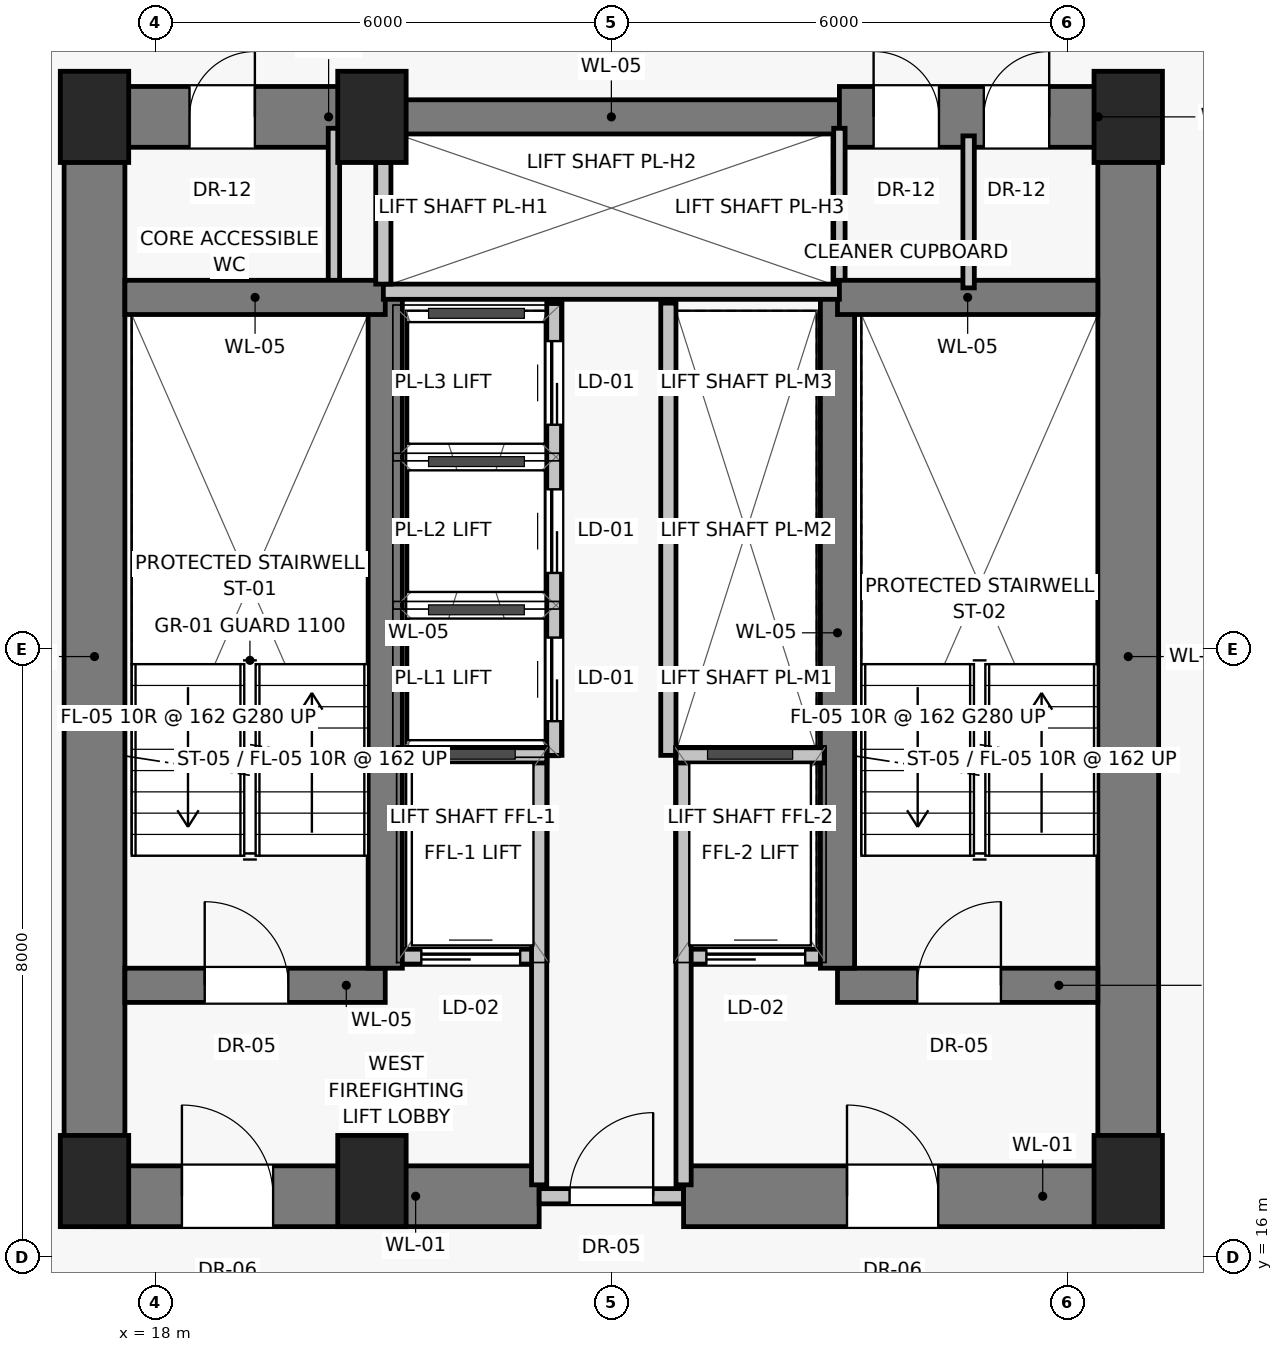
"""IFC4 building model, lengths in metres.
Left out: names, types, materials, properties, quantities, classifications, styles, units other than length and angle.
Written with IfcOpenShell. Run it as: python <this file> out.ifc"""

import sys

from ifc_helpers import new_model, si_unit, direction, frame, frame_2d, origin, origin_2d, place, context, subcontext, project, spatial, rectangle, extrude, source, transform, mapped, element, fill, save


model = new_model("IFC4")
c1 = context("Model", 3, precision=1e-05, world=origin(), true_north=direction((0.0, 1.0)))
c2 = subcontext(c1, "Body", "Model", "MODEL_VIEW")
j1 = project(units=[si_unit("LENGTHUNIT", "METRE"), si_unit("PLANEANGLEUNIT", "RADIAN")], contexts=[c1])
p1 = place(None, origin())
s1 = spatial("IfcSite", under=j1, at=p1, CompositionType="ELEMENT")
p2 = place(p1, origin())
s2 = spatial("IfcBuilding", under=s1, at=p2, CompositionType="ELEMENT")
p3 = place(p2, frame((0.0, 0.0, 77.1)))
s3 = spatial("IfcBuildingStorey", under=s2, at=p3, CompositionType="ELEMENT", Elevation=77.1)
for number, where, z_axis, x_axis in (
    (1, (17.2, 17.0, 0.0), (0.0, 0.0, 1.0), (1.0, 0.0, 0.0)),
    (2, (20.85, 17.0, 0.0), (0.0, 0.0, 1.0), (1.0, 0.0, 0.0)),
    (3, (30.8, 17.0, 0.0), (0.0, 0.0, 1.0), (1.0, 0.0, 0.0)),
    (4, (17.2, 31.0, 0.0), (0.0, 0.0, 1.0), (1.0, 0.0, 0.0)),
    (5, (20.85, 31.0, 0.0), (0.0, 0.0, 1.0), (1.0, 0.0, 0.0)),
    (6, (30.8, 31.0, 0.0), (0.0, 0.0, 1.0), (1.0, 0.0, 0.0)),
):
    element("IfcColumn", number, at=place(p3, frame(where, z_axis=z_axis, x_axis=x_axis)), inside=s3, PredefinedType="PILASTER", context=c2, shape_type="SweptSolid", body=[
        extrude(rectangle(XDim=0.9, YDim=1.2, at=origin_2d()), origin(), (0.0, 0.0, 1.0), 3.25),
    ])
for number, where, z_axis, x_axis in (
    (7, (17.2, 16.8, 0.0), (0.0, 0.0, 1.0), (0.0, 1.0, 0.0)),
    (8, (30.8, 16.8, 0.0), (0.0, 0.0, 1.0), (0.0, 1.0, 0.0)),
):
    element("IfcWall", number, at=place(p3, frame(where, z_axis=z_axis, x_axis=x_axis)), inside=s3, PredefinedType="SHEAR", context=c2, shape_type="SweptSolid", body=[
        extrude(rectangle(XDim=14.2, YDim=0.8, at=frame_2d((7.1, 0.0))), origin(), (0.0, 0.0, 1.0), 2.93),
    ])
p4 = place(p3, frame((17.2, 16.8, 0.0), z_axis=(0.0, 0.0, 1.0), x_axis=(1.0, 0.0, 0.0)))
e9 = element("IfcWall", 9, at=p4, inside=s3, PredefinedType="SHEAR", context=c2, shape_type="SweptSolid", body=[
    extrude(rectangle(XDim=5.85, YDim=0.8, at=frame_2d((2.925, 0.0))), origin(), (0.0, 0.0, 1.0), 2.93),
])
p5 = place(p4, frame((1.15, 0.0, 0.0)))
e10 = element("IfcOpeningElement", 10, at=p5, cuts=e9, PredefinedType="OPENING", context=c2, shape_type="SweptSolid", body=[
    extrude(rectangle(XDim=1.2, YDim=2.03, at=frame_2d((0.6, 1.015))), frame((0.0, 0.41, 0.0), z_axis=(0.0, -1.0, 0.0), x_axis=(1.0, 0.0, 0.0)), (0.0, 0.0, 1.0), 0.82),
])
p6 = place(p3, frame((23.05, 16.8, 0.0), z_axis=(0.0, 0.0, 1.0), x_axis=(1.0, 0.0, 0.0)))
e11 = element("IfcWall", 11, at=p6, inside=s3, PredefinedType="SOLIDWALL", context=c2, shape_type="SweptSolid", body=[
    extrude(rectangle(XDim=1.9, YDim=0.2, at=frame_2d((0.95, 0.0))), origin(), (0.0, 0.0, 1.0), 2.08),
])
p7 = place(p6, frame((0.4, 0.0, 0.0)))
e12 = element("IfcOpeningElement", 12, at=p7, cuts=e11, PredefinedType="OPENING", context=c2, shape_type="SweptSolid", body=[
    extrude(rectangle(XDim=1.1, YDim=2.03, at=frame_2d((0.55, 1.015))), frame((0.0, 0.11, 0.0), z_axis=(0.0, -1.0, 0.0), x_axis=(1.0, 0.0, 0.0)), (0.0, 0.0, 1.0), 0.22),
])
p8 = place(p3, frame((24.95, 16.8, 0.0), z_axis=(0.0, 0.0, 1.0), x_axis=(1.0, 0.0, 0.0)))
e13 = element("IfcWall", 13, at=p8, inside=s3, PredefinedType="SHEAR", context=c2, shape_type="SweptSolid", body=[
    extrude(rectangle(XDim=5.85, YDim=0.8, at=frame_2d((2.925, 0.0))), origin(), (0.0, 0.0, 1.0), 2.93),
])
p9 = place(p8, frame((2.15, 0.0, 0.0)))
e14 = element("IfcOpeningElement", 14, at=p9, cuts=e13, PredefinedType="OPENING", context=c2, shape_type="SweptSolid", body=[
    extrude(rectangle(XDim=1.2, YDim=2.03, at=frame_2d((0.6, 1.015))), frame((0.0, 0.41, 0.0), z_axis=(0.0, -1.0, 0.0), x_axis=(1.0, 0.0, 0.0)), (0.0, 0.0, 1.0), 0.82),
])
p10 = place(p3, frame((17.2, 31.0, 0.0), z_axis=(0.0, 0.0, 1.0), x_axis=(1.0, 0.0, 0.0)))
e15 = element("IfcWall", 15, at=p10, inside=s3, PredefinedType="SHEAR", context=c2, shape_type="SweptSolid", body=[
    extrude(rectangle(XDim=3.8, YDim=0.8, at=frame_2d((1.9, 0.0))), origin(), (0.0, 0.0, 1.0), 2.93),
])
p11 = place(p10, frame((1.25, 0.0, 0.0)))
e16 = element("IfcOpeningElement", 16, at=p11, cuts=e15, PredefinedType="OPENING", context=c2, shape_type="SweptSolid", body=[
    extrude(rectangle(XDim=0.86, YDim=2.01, at=frame_2d((0.43, 1.005))), frame((0.0, 0.41, 0.0), z_axis=(0.0, -1.0, 0.0), x_axis=(1.0, 0.0, 0.0)), (0.0, 0.0, 1.0), 0.82),
])
p12 = place(p3, frame((21.0, 31.0, 0.0), z_axis=(0.0, 0.0, 1.0), x_axis=(1.0, 0.0, 0.0)))
e17 = element("IfcWall", 17, at=p12, inside=s3, PredefinedType="SHEAR", context=c2, shape_type="SweptSolid", body=[
    extrude(rectangle(XDim=6.0, YDim=0.45, at=frame_2d((3.0, 0.0))), origin(), (0.0, 0.0, 1.0), 2.93),
])
p13 = place(p3, frame((27.0, 31.0, 0.0), z_axis=(0.0, 0.0, 1.0), x_axis=(1.0, 0.0, 0.0)))
e18 = element("IfcWall", 18, at=p13, inside=s3, PredefinedType="SHEAR", context=c2, shape_type="SweptSolid", body=[
    extrude(rectangle(XDim=3.8, YDim=0.8, at=frame_2d((1.9, 0.0))), origin(), (0.0, 0.0, 1.0), 2.93),
])
p14 = place(p13, frame((0.45, 0.0, 0.0)))
e19 = element("IfcOpeningElement", 19, at=p14, cuts=e18, PredefinedType="OPENING", context=c2, shape_type="SweptSolid", body=[
    extrude(rectangle(XDim=0.86, YDim=2.01, at=frame_2d((0.43, 1.005))), frame((0.0, 0.41, 0.0), z_axis=(0.0, -1.0, 0.0), x_axis=(1.0, 0.0, 0.0)), (0.0, 0.0, 1.0), 0.82),
])
p15 = place(p13, frame((1.9, 0.0, 0.0)))
e20 = element("IfcOpeningElement", 20, at=p15, cuts=e18, PredefinedType="OPENING", context=c2, shape_type="SweptSolid", body=[
    extrude(rectangle(XDim=0.86, YDim=2.01, at=frame_2d((0.43, 1.005))), frame((0.0, 0.41, 0.0), z_axis=(0.0, -1.0, 0.0), x_axis=(1.0, 0.0, 0.0)), (0.0, 0.0, 1.0), 0.82),
])
for number, where, z_axis, x_axis in (
    (21, (20.35, 28.65, 0.0), (0.0, 0.0, 1.0), (0.0, 1.0, 0.0)),
    (22, (27.0, 28.65, 0.0), (0.0, 0.0, 1.0), (0.0, 1.0, 0.0)),
):
    element("IfcWall", number, at=place(p3, frame(where, z_axis=z_axis, x_axis=x_axis)), inside=s3, PredefinedType="PARTITIONING", context=c2, shape_type="SweptSolid", body=[
        extrude(rectangle(XDim=2.2, YDim=0.15, at=frame_2d((1.1, 0.0))), origin(), (0.0, 0.0, 1.0), 2.93),
    ])
p16 = place(p3, frame((17.6, 19.575, 0.0), z_axis=(0.0, 0.0, 1.0), x_axis=(1.0, 0.0, 0.0)))
e23 = element("IfcWall", 23, at=p16, inside=s3, PredefinedType="SHEAR", context=c2, shape_type="SweptSolid", body=[
    extrude(rectangle(XDim=3.425, YDim=0.45, at=frame_2d((1.712, 0.0))), origin(), (0.0, 0.0, 1.0), 2.93),
])
p17 = place(p16, frame((1.05, 0.0, 0.0)))
e24 = element("IfcOpeningElement", 24, at=p17, cuts=e23, PredefinedType="OPENING", context=c2, shape_type="SweptSolid", body=[
    extrude(rectangle(XDim=1.1, YDim=2.03, at=frame_2d((0.55, 1.015))), frame((0.0, 0.235, 0.0), z_axis=(0.0, -1.0, 0.0), x_axis=(1.0, 0.0, 0.0)), (0.0, 0.0, 1.0), 0.47),
])
p18 = place(p3, frame((21.2, 19.95, 0.0), z_axis=(0.0, 0.0, 1.0), x_axis=(1.0, 0.0, 0.0)))
e25 = element("IfcWall", 25, at=p18, inside=s3, PredefinedType="SOLIDWALL", context=c2, shape_type="SweptSolid", body=[
    extrude(rectangle(XDim=1.85, YDim=0.2, at=frame_2d((0.925, 0.0))), origin(), (0.0, 0.0, 1.0), 2.93),
])
p19 = place(p18, frame((0.3, 0.0, 0.0)))
e26 = element("IfcOpeningElement", 26, at=p19, cuts=e25, PredefinedType="OPENING", context=c2, shape_type="SweptSolid", body=[
    extrude(rectangle(XDim=1.3, YDim=2.25, at=frame_2d((0.65, 1.125))), frame((0.0, 0.11, 0.0), z_axis=(0.0, -1.0, 0.0), x_axis=(1.0, 0.0, 0.0)), (0.0, 0.0, 1.0), 0.22),
])
p20 = place(p3, frame((24.95, 19.95, 0.0), z_axis=(0.0, 0.0, 1.0), x_axis=(1.0, 0.0, 0.0)))
e27 = element("IfcWall", 27, at=p20, inside=s3, PredefinedType="SOLIDWALL", context=c2, shape_type="SweptSolid", body=[
    extrude(rectangle(XDim=1.85, YDim=0.2, at=frame_2d((0.925, 0.0))), origin(), (0.0, 0.0, 1.0), 2.93),
])
p21 = place(p20, frame((0.3, 0.0, 0.0)))
e28 = element("IfcOpeningElement", 28, at=p21, cuts=e27, PredefinedType="OPENING", context=c2, shape_type="SweptSolid", body=[
    extrude(rectangle(XDim=1.3, YDim=2.25, at=frame_2d((0.65, 1.125))), frame((0.0, 0.11, 0.0), z_axis=(0.0, -1.0, 0.0), x_axis=(1.0, 0.0, 0.0)), (0.0, 0.0, 1.0), 0.22),
])
p22 = place(p3, frame((26.975, 19.575, 0.0), z_axis=(0.0, 0.0, 1.0), x_axis=(1.0, 0.0, 0.0)))
e29 = element("IfcWall", 29, at=p22, inside=s3, PredefinedType="SHEAR", context=c2, shape_type="SweptSolid", body=[
    extrude(rectangle(XDim=3.425, YDim=0.45, at=frame_2d((1.712, 0.0))), origin(), (0.0, 0.0, 1.0), 2.93),
])
p23 = place(p22, frame((1.05, 0.0, 0.0)))
e30 = element("IfcOpeningElement", 30, at=p23, cuts=e29, PredefinedType="OPENING", context=c2, shape_type="SweptSolid", body=[
    extrude(rectangle(XDim=1.1, YDim=2.03, at=frame_2d((0.55, 1.015))), frame((0.0, 0.235, 0.0), z_axis=(0.0, -1.0, 0.0), x_axis=(1.0, 0.0, 0.0)), (0.0, 0.0, 1.0), 0.47),
])
for number, where, z_axis, x_axis in (
    (31, (21.025, 19.8, 0.0), (0.0, 0.0, 1.0), (0.0, 1.0, 0.0)),
    (32, (26.975, 19.8, 0.0), (0.0, 0.0, 1.0), (0.0, 1.0, 0.0)),
):
    element("IfcWall", number, at=place(p3, frame(where, z_axis=z_axis, x_axis=x_axis)), inside=s3, PredefinedType="SHEAR", context=c2, shape_type="SweptSolid", body=[
        extrude(rectangle(XDim=8.825, YDim=0.45, at=frame_2d((4.413, 0.0))), origin(), (0.0, 0.0, 1.0), 2.93),
    ])
for number, where, z_axis, x_axis in (
    (33, (17.6, 28.625, 0.0), (0.0, 0.0, 1.0), (1.0, 0.0, 0.0)),
    (34, (26.975, 28.625, 0.0), (0.0, 0.0, 1.0), (1.0, 0.0, 0.0)),
):
    element("IfcWall", number, at=place(p3, frame(where, z_axis=z_axis, x_axis=x_axis)), inside=s3, PredefinedType="SHEAR", context=c2, shape_type="SweptSolid", body=[
        extrude(rectangle(XDim=3.425, YDim=0.45, at=frame_2d((1.712, 0.0))), origin(), (0.0, 0.0, 1.0), 2.93),
    ])
for number, where, z_axis, x_axis in (
    (35, (23.05, 16.95, 0.0), (0.0, 0.0, 1.0), (0.0, 1.0, 0.0)),
    (36, (24.95, 16.95, 0.0), (0.0, 0.0, 1.0), (0.0, 1.0, 0.0)),
):
    element("IfcWall", number, at=place(p3, frame(where, z_axis=z_axis, x_axis=x_axis)), inside=s3, PredefinedType="SOLIDWALL", context=c2, shape_type="SweptSolid", body=[
        extrude(rectangle(XDim=5.6, YDim=0.2, at=frame_2d((2.8, 0.0))), origin(), (0.0, 0.0, 1.0), 2.93),
    ])
for number, where, z_axis, x_axis in (
    (37, (21.2, 22.6, 0.0), (0.0, 0.0, 1.0), (1.0, 0.0, 0.0)),
    (38, (24.85, 22.6, 0.0), (0.0, 0.0, 1.0), (1.0, 0.0, 0.0)),
):
    element("IfcWall", number, at=place(p3, frame(where, z_axis=z_axis, x_axis=x_axis)), inside=s3, PredefinedType="SOLIDWALL", context=c2, shape_type="SweptSolid", body=[
        extrude(rectangle(XDim=1.95, YDim=0.2, at=frame_2d((0.975, 0.0))), origin(), (0.0, 0.0, 1.0), 2.93),
    ])
p24 = place(p3, frame((21.0, 28.7, 0.0), z_axis=(0.0, 0.0, 1.0), x_axis=(1.0, 0.0, 0.0)))
e39 = element("IfcWall", 39, at=p24, inside=s3, PredefinedType="SOLIDWALL", context=c2, shape_type="SweptSolid", body=[
    extrude(rectangle(XDim=6.0, YDim=0.2, at=frame_2d((3.0, 0.0))), origin(), (0.0, 0.0, 1.0), 2.93),
])
p25 = place(p3, frame((21.0, 28.8, 0.0), z_axis=(0.0, 0.0, 1.0), x_axis=(0.0, 1.0, 0.0)))
e40 = element("IfcWall", 40, at=p25, inside=s3, PredefinedType="SOLIDWALL", context=c2, shape_type="SweptSolid", body=[
    extrude(rectangle(XDim=1.6, YDim=0.2, at=frame_2d((0.8, 0.0))), origin(), (0.0, 0.0, 1.0), 2.93),
])
p26 = place(p3, frame((23.25, 22.6, 0.0), z_axis=(0.0, 0.0, 1.0), x_axis=(0.0, 1.0, 0.0)))
e41 = element("IfcWall", 41, at=p26, inside=s3, PredefinedType="SOLIDWALL", context=c2, shape_type="SweptSolid", body=[
    extrude(rectangle(XDim=5.95, YDim=0.2, at=frame_2d((2.975, 0.0))), origin(), (0.0, 0.0, 1.0), 2.93),
])
p27 = place(p26, frame((0.45, 0.0, 0.0)))
e42 = element("IfcOpeningElement", 42, at=p27, cuts=e41, PredefinedType="OPENING", context=c2, shape_type="SweptSolid", body=[
    extrude(rectangle(XDim=1.1, YDim=2.08, at=frame_2d((0.55, 1.04))), frame((0.0, 0.11, 0.0), z_axis=(0.0, -1.0, 0.0), x_axis=(1.0, 0.0, 0.0)), (0.0, 0.0, 1.0), 0.22),
])
p28 = place(p26, frame((2.4, 0.0, 0.0)))
e43 = element("IfcOpeningElement", 43, at=p28, cuts=e41, PredefinedType="OPENING", context=c2, shape_type="SweptSolid", body=[
    extrude(rectangle(XDim=1.1, YDim=2.08, at=frame_2d((0.55, 1.04))), frame((0.0, 0.11, 0.0), z_axis=(0.0, -1.0, 0.0), x_axis=(1.0, 0.0, 0.0)), (0.0, 0.0, 1.0), 0.22),
])
p29 = place(p26, frame((4.35, 0.0, 0.0)))
e44 = element("IfcOpeningElement", 44, at=p29, cuts=e41, PredefinedType="OPENING", context=c2, shape_type="SweptSolid", body=[
    extrude(rectangle(XDim=1.1, YDim=2.08, at=frame_2d((0.55, 1.04))), frame((0.0, 0.11, 0.0), z_axis=(0.0, -1.0, 0.0), x_axis=(1.0, 0.0, 0.0)), (0.0, 0.0, 1.0), 0.22),
])
p30 = place(p3, frame((24.75, 22.6, 0.0), z_axis=(0.0, 0.0, 1.0), x_axis=(0.0, 1.0, 0.0)))
e45 = element("IfcWall", 45, at=p30, inside=s3, PredefinedType="SOLIDWALL", context=c2, shape_type="SweptSolid", body=[
    extrude(rectangle(XDim=5.95, YDim=0.2, at=frame_2d((2.975, 0.0))), origin(), (0.0, 0.0, 1.0), 2.93),
])
p31 = place(p3, frame((28.7, 28.75, 0.0), z_axis=(0.0, 0.0, 1.0), x_axis=(0.0, 1.0, 0.0)))
e46 = element("IfcWall", 46, at=p31, inside=s3, PredefinedType="PARTITIONING", context=c2, shape_type="SweptSolid", body=[
    extrude(rectangle(XDim=2.0, YDim=0.15, at=frame_2d((1.0, 0.0))), origin(), (0.0, 0.0, 1.0), 2.93),
])
m1 = source(origin(), c2, "Body", "SweptSolid", [
    extrude(rectangle(XDim=1.2, YDim=2.03, at=frame_2d((0.6, 1.015))), frame((0.0, 0.025, 0.0), z_axis=(0.0, -1.0, 0.0), x_axis=(1.0, 0.0, 0.0)), (0.0, 0.0, 1.0), 0.05),
])
p32 = place(p5, origin())
e47 = element("IfcDoor", 47, at=p32, inside=s3, OperationType="SINGLE_SWING_LEFT", PredefinedType="DOOR", context=c2, shape_type="MappedRepresentation", body=[
    mapped(m1, transform((0.0, 0.0, 0.0), scale=1.0)),
])
fill(e10, e47)
m2 = source(origin(), c2, "Body", "SweptSolid", [
    extrude(rectangle(XDim=1.1, YDim=2.03, at=frame_2d((0.55, 1.015))), frame((0.0, 0.025, 0.0), z_axis=(0.0, -1.0, 0.0), x_axis=(1.0, 0.0, 0.0)), (0.0, 0.0, 1.0), 0.05),
])
p33 = place(p7, origin())
e48 = element("IfcDoor", 48, at=p33, inside=s3, OperationType="SINGLE_SWING_RIGHT", PredefinedType="DOOR", context=c2, shape_type="MappedRepresentation", body=[
    mapped(m2, transform((0.0, 0.0, 0.0), scale=1.0)),
])
fill(e12, e48)
p34 = place(p9, origin())
e49 = element("IfcDoor", 49, at=p34, inside=s3, OperationType="SINGLE_SWING_LEFT", PredefinedType="DOOR", context=c2, shape_type="MappedRepresentation", body=[
    mapped(m1, transform((0.0, 0.0, 0.0), scale=1.0)),
])
fill(e14, e49)
m3 = source(origin(), c2, "Body", "SweptSolid", [
    extrude(rectangle(XDim=0.86, YDim=2.01, at=frame_2d((0.43, 1.005))), frame((0.0, 0.025, 0.0), z_axis=(0.0, -1.0, 0.0), x_axis=(1.0, 0.0, 0.0)), (0.0, 0.0, 1.0), 0.05),
])
p35 = place(p11, origin())
e50 = element("IfcDoor", 50, at=p35, inside=s3, OperationType="SINGLE_SWING_RIGHT", PredefinedType="DOOR", context=c2, shape_type="MappedRepresentation", body=[
    mapped(m3, transform((0.0, 0.0, 0.0), scale=1.0)),
])
fill(e16, e50)
p36 = place(p14, origin())
e51 = element("IfcDoor", 51, at=p36, inside=s3, OperationType="SINGLE_SWING_LEFT", PredefinedType="DOOR", context=c2, shape_type="MappedRepresentation", body=[
    mapped(m3, transform((0.0, 0.0, 0.0), scale=1.0)),
])
fill(e19, e51)
p37 = place(p15, origin())
e52 = element("IfcDoor", 52, at=p37, inside=s3, OperationType="SINGLE_SWING_RIGHT", PredefinedType="DOOR", context=c2, shape_type="MappedRepresentation", body=[
    mapped(m3, transform((0.0, 0.0, 0.0), scale=1.0)),
])
fill(e20, e52)
p38 = place(p17, origin())
e53 = element("IfcDoor", 53, at=p38, inside=s3, OperationType="SINGLE_SWING_LEFT", PredefinedType="DOOR", context=c2, shape_type="MappedRepresentation", body=[
    mapped(m2, transform((0.0, 0.0, 0.0), scale=1.0)),
])
fill(e24, e53)
m4 = source(origin(), c2, "Body", "SweptSolid", [
    extrude(rectangle(XDim=1.3, YDim=2.25, at=frame_2d((0.65, 1.125))), frame((0.0, 0.025, 0.0), z_axis=(0.0, -1.0, 0.0), x_axis=(1.0, 0.0, 0.0)), (0.0, 0.0, 1.0), 0.05),
])
p39 = place(p19, origin())
e54 = element("IfcDoor", 54, at=p39, inside=s3, OperationType="SLIDING_TO_LEFT", PredefinedType="DOOR", context=c2, shape_type="MappedRepresentation", body=[
    mapped(m4, transform((0.0, 0.0, 0.0), scale=1.0)),
])
fill(e26, e54)
p40 = place(p21, origin())
e55 = element("IfcDoor", 55, at=p40, inside=s3, OperationType="SLIDING_TO_LEFT", PredefinedType="DOOR", context=c2, shape_type="MappedRepresentation", body=[
    mapped(m4, transform((0.0, 0.0, 0.0), scale=1.0)),
])
fill(e28, e55)
p41 = place(p23, origin())
e56 = element("IfcDoor", 56, at=p41, inside=s3, OperationType="SINGLE_SWING_RIGHT", PredefinedType="DOOR", context=c2, shape_type="MappedRepresentation", body=[
    mapped(m2, transform((0.0, 0.0, 0.0), scale=1.0)),
])
fill(e30, e56)
m5 = source(origin(), c2, "Body", "SweptSolid", [
    extrude(rectangle(XDim=1.1, YDim=2.08, at=frame_2d((0.55, 1.04))), frame((0.0, 0.025, 0.0), z_axis=(0.0, -1.0, 0.0), x_axis=(1.0, 0.0, 0.0)), (0.0, 0.0, 1.0), 0.05),
])
p42 = place(p27, origin())
e57 = element("IfcDoor", 57, at=p42, inside=s3, OperationType="SLIDING_TO_LEFT", PredefinedType="DOOR", context=c2, shape_type="MappedRepresentation", body=[
    mapped(m5, transform((0.0, 0.0, 0.0), scale=1.0)),
])
fill(e42, e57)
p43 = place(p28, origin())
e58 = element("IfcDoor", 58, at=p43, inside=s3, OperationType="SLIDING_TO_LEFT", PredefinedType="DOOR", context=c2, shape_type="MappedRepresentation", body=[
    mapped(m5, transform((0.0, 0.0, 0.0), scale=1.0)),
])
fill(e43, e58)
p44 = place(p29, origin())
e59 = element("IfcDoor", 59, at=p44, inside=s3, OperationType="SLIDING_TO_LEFT", PredefinedType="DOOR", context=c2, shape_type="MappedRepresentation", body=[
    mapped(m5, transform((0.0, 0.0, 0.0), scale=1.0)),
])
fill(e44, e59)
save(model, sys.argv[1])
